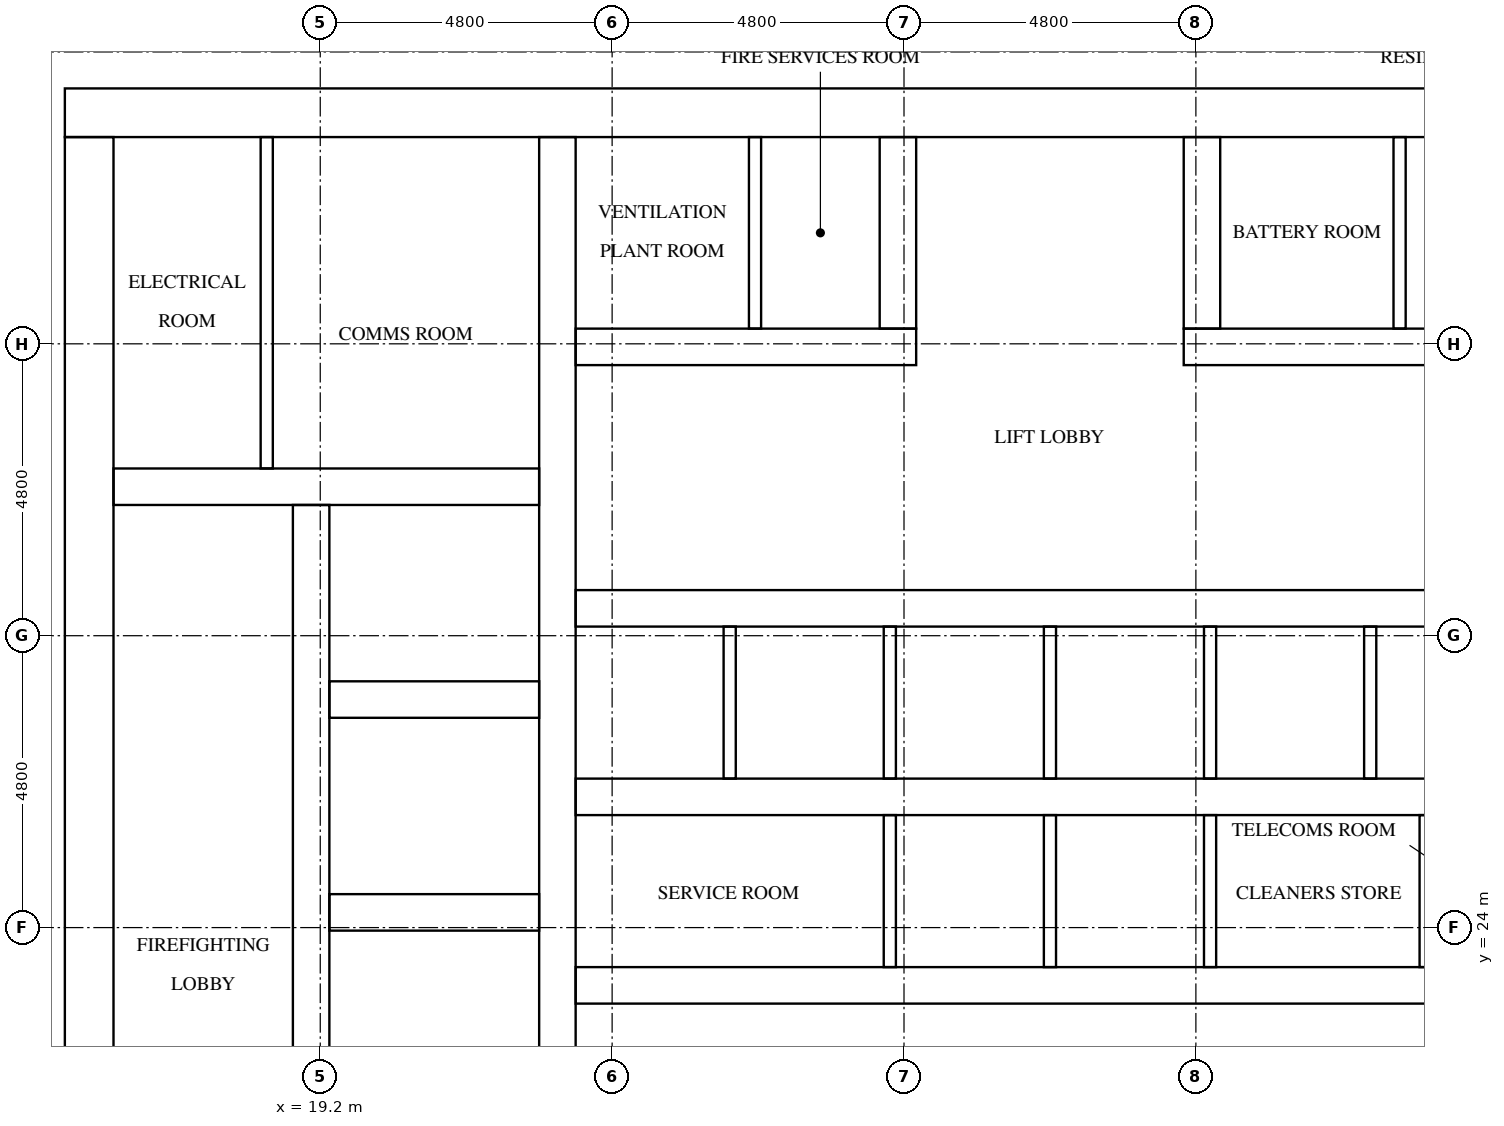
"""IFC4 building model, lengths in metres.
Left out: names, types, materials, properties, quantities, classifications, styles, units other than length and angle.
Written with IfcOpenShell. Run it as: python <this file> out.ifc"""

import sys

from ifc_helpers import new_model, si_unit, direction, frame, frame_2d, origin, place, context, subcontext, project, spatial, rectangle, extrude, element, fill, save


model = new_model("IFC4")
c1 = context("Model", 3, precision=1e-05, world=origin(), true_north=direction((0.0, 1.0)))
c2 = subcontext(c1, "Body", "Model", "MODEL_VIEW")
j1 = project(units=[si_unit("LENGTHUNIT", "METRE"), si_unit("PLANEANGLEUNIT", "RADIAN")], contexts=[c1])
p1 = place(None, origin())
s1 = spatial("IfcSite", under=j1, at=p1, CompositionType="ELEMENT")
p2 = place(p1, origin())
s2 = spatial("IfcBuilding", under=s1, at=p2, CompositionType="ELEMENT")
p3 = place(p2, frame((0.0, 0.0, 170.0)))
s3 = spatial("IfcBuildingStorey", under=s2, at=p3, CompositionType="ELEMENT", Elevation=170.0)
p4 = place(p3, frame((15.0, 37.4, 0.0), z_axis=(0.0, 0.0, 1.0), x_axis=(1.0, 0.0, 0.0)))
e1 = element("IfcWall", 1, at=p4, inside=s3, PredefinedType="SHEAR", context=c2, shape_type="SweptSolid", body=[
    extrude(rectangle(XDim=32.4, YDim=0.8, at=frame_2d((16.2, 0.0))), origin(), (0.0, 0.0, 1.0), 3.1),
])
p5 = place(p4, frame((15.3, 0.0, 0.0)))
e2 = element("IfcOpeningElement", 2, at=p5, cuts=e1, PredefinedType="OPENING", context=c2, shape_type="SweptSolid", body=[
    extrude(rectangle(XDim=1.8, YDim=2.1, at=frame_2d((0.9, 1.05))), frame((0.0, 0.41, 0.0), z_axis=(0.0, -1.0, 0.0), x_axis=(1.0, 0.0, 0.0)), (0.0, 0.0, 1.0), 0.82),
])
p6 = place(p4, frame((1.51, 0.0, 0.0)))
e3 = element("IfcOpeningElement", 3, at=p6, cuts=e1, PredefinedType="OPENING", context=c2, shape_type="SweptSolid", body=[
    extrude(rectangle(XDim=1.0, YDim=2.1, at=frame_2d((0.5, 1.05))), frame((0.0, 0.41, 0.0), z_axis=(0.0, -1.0, 0.0), x_axis=(1.0, 0.0, 0.0)), (0.0, 0.0, 1.0), 0.82),
])
p7 = place(p4, frame((5.11, 0.0, 0.0)))
e4 = element("IfcOpeningElement", 4, at=p7, cuts=e1, PredefinedType="OPENING", context=c2, shape_type="SweptSolid", body=[
    extrude(rectangle(XDim=1.0, YDim=2.1, at=frame_2d((0.5, 1.05))), frame((0.0, 0.41, 0.0), z_axis=(0.0, -1.0, 0.0), x_axis=(1.0, 0.0, 0.0)), (0.0, 0.0, 1.0), 0.82),
])
p8 = place(p3, frame((15.4, 15.8, 0.0), z_axis=(0.0, 0.0, 1.0), x_axis=(0.0, 1.0, 0.0)))
e5 = element("IfcWall", 5, at=p8, inside=s3, PredefinedType="SHEAR", context=c2, shape_type="SweptSolid", body=[
    extrude(rectangle(XDim=21.2, YDim=0.8, at=frame_2d((10.6, 0.0))), origin(), (0.0, 0.0, 1.0), 3.1),
])
p9 = place(p8, frame((4.96, 0.0, 0.0)))
e6 = element("IfcOpeningElement", 6, at=p9, cuts=e5, PredefinedType="OPENING", context=c2, shape_type="SweptSolid", body=[
    extrude(rectangle(XDim=1.2, YDim=2.1, at=frame_2d((0.6, 1.05))), frame((0.0, 0.41, 0.0), z_axis=(0.0, -1.0, 0.0), x_axis=(1.0, 0.0, 0.0)), (0.0, 0.0, 1.0), 0.82),
])
p10 = place(p3, frame((19.05, 15.8, 0.0), z_axis=(0.0, 0.0, 1.0), x_axis=(0.0, 1.0, 0.0)))
e7 = element("IfcWall", 7, at=p10, inside=s3, PredefinedType="SHEAR", context=c2, shape_type="SweptSolid", body=[
    extrude(rectangle(XDim=15.15, YDim=0.6, at=frame_2d((7.575, 0.0))), origin(), (0.0, 0.0, 1.0), 3.1),
])
p11 = place(p10, frame((9.65, 0.0, 0.0)))
e8 = element("IfcOpeningElement", 8, at=p11, cuts=e7, PredefinedType="OPENING", context=c2, shape_type="SweptSolid", body=[
    extrude(rectangle(XDim=1.1, YDim=2.1, at=frame_2d((0.55, 1.05))), frame((0.0, 0.31, 0.0), z_axis=(0.0, -1.0, 0.0), x_axis=(1.0, 0.0, 0.0)), (0.0, 0.0, 1.0), 0.62),
])
p12 = place(p10, frame((13.15, 0.0, 0.0)))
e9 = element("IfcOpeningElement", 9, at=p12, cuts=e7, PredefinedType="OPENING", context=c2, shape_type="SweptSolid", body=[
    extrude(rectangle(XDim=1.1, YDim=2.1, at=frame_2d((0.55, 1.05))), frame((0.0, 0.31, 0.0), z_axis=(0.0, -1.0, 0.0), x_axis=(1.0, 0.0, 0.0)), (0.0, 0.0, 1.0), 0.62),
])
p13 = place(p10, frame((0.4, 0.0, 0.0)))
e10 = element("IfcOpeningElement", 10, at=p13, cuts=e7, PredefinedType="OPENING", context=c2, shape_type="SweptSolid", body=[
    extrude(rectangle(XDim=1.2, YDim=2.1, at=frame_2d((0.6, 1.05))), frame((0.0, 0.31, 0.0), z_axis=(0.0, -1.0, 0.0), x_axis=(1.0, 0.0, 0.0)), (0.0, 0.0, 1.0), 0.62),
])
p14 = place(p3, frame((23.1, 15.8, 0.0), z_axis=(0.0, 0.0, 1.0), x_axis=(0.0, 1.0, 0.0)))
e11 = element("IfcWall", 11, at=p14, inside=s3, PredefinedType="SHEAR", context=c2, shape_type="SweptSolid", body=[
    extrude(rectangle(XDim=21.2, YDim=0.6, at=frame_2d((10.6, 0.0))), origin(), (0.0, 0.0, 1.0), 3.1),
])
for number, where, z_axis, x_axis in (
    (12, (19.35, 24.25, 0.0), (0.0, 0.0, 1.0), (1.0, 0.0, 0.0)),
    (13, (19.35, 27.75, 0.0), (0.0, 0.0, 1.0), (1.0, 0.0, 0.0)),
):
    element("IfcWall", number, at=place(p3, frame(where, z_axis=z_axis, x_axis=x_axis)), inside=s3, PredefinedType="SHEAR", context=c2, shape_type="SweptSolid", body=[
        extrude(rectangle(XDim=3.45, YDim=0.6, at=frame_2d((1.725, 0.0))), origin(), (0.0, 0.0, 1.0), 3.1),
    ])
p15 = place(p3, frame((15.8, 31.25, 0.0), z_axis=(0.0, 0.0, 1.0), x_axis=(1.0, 0.0, 0.0)))
e14 = element("IfcWall", 14, at=p15, inside=s3, PredefinedType="SHEAR", context=c2, shape_type="SweptSolid", body=[
    extrude(rectangle(XDim=7.0, YDim=0.6, at=frame_2d((3.5, 0.0))), origin(), (0.0, 0.0, 1.0), 3.1),
])
p16 = place(p3, frame((23.4, 23.05, 0.0), z_axis=(0.0, 0.0, 1.0), x_axis=(1.0, 0.0, 0.0)))
e15 = element("IfcWall", 15, at=p16, inside=s3, PredefinedType="SHEAR", context=c2, shape_type="SweptSolid", body=[
    extrude(rectangle(XDim=15.6, YDim=0.6, at=frame_2d((7.8, 0.0))), origin(), (0.0, 0.0, 1.0), 3.1),
])
p17 = place(p16, frame((2.033, 0.0, 0.0)))
e16 = element("IfcOpeningElement", 16, at=p17, cuts=e15, PredefinedType="OPENING", context=c2, shape_type="SweptSolid", body=[
    extrude(rectangle(XDim=1.0, YDim=2.1, at=frame_2d((0.5, 1.05))), frame((0.0, 0.31, 0.0), z_axis=(0.0, -1.0, 0.0), x_axis=(1.0, 0.0, 0.0)), (0.0, 0.0, 1.0), 0.62),
])
p18 = place(p16, frame((11.706, 0.0, 0.0)))
e17 = element("IfcOpeningElement", 17, at=p18, cuts=e15, PredefinedType="OPENING", context=c2, shape_type="SweptSolid", body=[
    extrude(rectangle(XDim=1.0, YDim=2.1, at=frame_2d((0.5, 1.05))), frame((0.0, 0.31, 0.0), z_axis=(0.0, -1.0, 0.0), x_axis=(1.0, 0.0, 0.0)), (0.0, 0.0, 1.0), 0.62),
])
p19 = place(p16, frame((14.339, 0.0, 0.0)))
e18 = element("IfcOpeningElement", 18, at=p19, cuts=e15, PredefinedType="OPENING", context=c2, shape_type="SweptSolid", body=[
    extrude(rectangle(XDim=1.0, YDim=2.1, at=frame_2d((0.5, 1.05))), frame((0.0, 0.31, 0.0), z_axis=(0.0, -1.0, 0.0), x_axis=(1.0, 0.0, 0.0)), (0.0, 0.0, 1.0), 0.62),
])
p20 = place(p3, frame((23.4, 26.15, 0.0), z_axis=(0.0, 0.0, 1.0), x_axis=(1.0, 0.0, 0.0)))
e19 = element("IfcWall", 19, at=p20, inside=s3, PredefinedType="SHEAR", context=c2, shape_type="SweptSolid", body=[
    extrude(rectangle(XDim=15.6, YDim=0.6, at=frame_2d((7.8, 0.0))), origin(), (0.0, 0.0, 1.0), 3.1),
])
p21 = place(p3, frame((23.4, 29.25, 0.0), z_axis=(0.0, 0.0, 1.0), x_axis=(1.0, 0.0, 0.0)))
e20 = element("IfcWall", 20, at=p21, inside=s3, PredefinedType="SHEAR", context=c2, shape_type="SweptSolid", body=[
    extrude(rectangle(XDim=15.6, YDim=0.6, at=frame_2d((7.8, 0.0))), origin(), (0.0, 0.0, 1.0), 3.1),
])
p22 = place(p21, frame((0.667, 0.0, 0.0)))
e21 = element("IfcOpeningElement", 21, at=p22, cuts=e20, PredefinedType="OPENING", context=c2, shape_type="SweptSolid", body=[
    extrude(rectangle(XDim=1.1, YDim=2.1, at=frame_2d((0.55, 1.05))), frame((0.0, 0.31, 0.0), z_axis=(0.0, -1.0, 0.0), x_axis=(1.0, 0.0, 0.0)), (0.0, 0.0, 1.0), 0.62),
])
p23 = place(p21, frame((3.3, 0.0, 0.0)))
e22 = element("IfcOpeningElement", 22, at=p23, cuts=e20, PredefinedType="OPENING", context=c2, shape_type="SweptSolid", body=[
    extrude(rectangle(XDim=1.1, YDim=2.1, at=frame_2d((0.55, 1.05))), frame((0.0, 0.31, 0.0), z_axis=(0.0, -1.0, 0.0), x_axis=(1.0, 0.0, 0.0)), (0.0, 0.0, 1.0), 0.62),
])
p24 = place(p21, frame((5.933, 0.0, 0.0)))
e23 = element("IfcOpeningElement", 23, at=p24, cuts=e20, PredefinedType="OPENING", context=c2, shape_type="SweptSolid", body=[
    extrude(rectangle(XDim=1.1, YDim=2.1, at=frame_2d((0.55, 1.05))), frame((0.0, 0.31, 0.0), z_axis=(0.0, -1.0, 0.0), x_axis=(1.0, 0.0, 0.0)), (0.0, 0.0, 1.0), 0.62),
])
p25 = place(p21, frame((8.567, 0.0, 0.0)))
e24 = element("IfcOpeningElement", 24, at=p25, cuts=e20, PredefinedType="OPENING", context=c2, shape_type="SweptSolid", body=[
    extrude(rectangle(XDim=1.1, YDim=2.1, at=frame_2d((0.55, 1.05))), frame((0.0, 0.31, 0.0), z_axis=(0.0, -1.0, 0.0), x_axis=(1.0, 0.0, 0.0)), (0.0, 0.0, 1.0), 0.62),
])
p26 = place(p21, frame((11.2, 0.0, 0.0)))
e25 = element("IfcOpeningElement", 25, at=p26, cuts=e20, PredefinedType="OPENING", context=c2, shape_type="SweptSolid", body=[
    extrude(rectangle(XDim=1.1, YDim=2.1, at=frame_2d((0.55, 1.05))), frame((0.0, 0.31, 0.0), z_axis=(0.0, -1.0, 0.0), x_axis=(1.0, 0.0, 0.0)), (0.0, 0.0, 1.0), 0.62),
])
p27 = place(p21, frame((13.833, 0.0, 0.0)))
e26 = element("IfcOpeningElement", 26, at=p27, cuts=e20, PredefinedType="OPENING", context=c2, shape_type="SweptSolid", body=[
    extrude(rectangle(XDim=1.1, YDim=2.1, at=frame_2d((0.55, 1.05))), frame((0.0, 0.31, 0.0), z_axis=(0.0, -1.0, 0.0), x_axis=(1.0, 0.0, 0.0)), (0.0, 0.0, 1.0), 0.62),
])
p28 = place(p3, frame((23.4, 33.55, 0.0), z_axis=(0.0, 0.0, 1.0), x_axis=(1.0, 0.0, 0.0)))
e27 = element("IfcWall", 27, at=p28, inside=s3, PredefinedType="SHEAR", context=c2, shape_type="SweptSolid", body=[
    extrude(rectangle(XDim=5.6, YDim=0.6, at=frame_2d((2.8, 0.0))), origin(), (0.0, 0.0, 1.0), 3.1),
])
p29 = place(p28, frame((0.925, 0.0, 0.0)))
e28 = element("IfcOpeningElement", 28, at=p29, cuts=e27, PredefinedType="OPENING", context=c2, shape_type="SweptSolid", body=[
    extrude(rectangle(XDim=1.0, YDim=2.1, at=frame_2d((0.5, 1.05))), frame((0.0, 0.31, 0.0), z_axis=(0.0, -1.0, 0.0), x_axis=(1.0, 0.0, 0.0)), (0.0, 0.0, 1.0), 0.62),
])
p30 = place(p28, frame((3.525, 0.0, 0.0)))
e29 = element("IfcOpeningElement", 29, at=p30, cuts=e27, PredefinedType="OPENING", context=c2, shape_type="SweptSolid", body=[
    extrude(rectangle(XDim=1.0, YDim=2.1, at=frame_2d((0.5, 1.05))), frame((0.0, 0.31, 0.0), z_axis=(0.0, -1.0, 0.0), x_axis=(1.0, 0.0, 0.0)), (0.0, 0.0, 1.0), 0.62),
])
p31 = place(p3, frame((33.4, 33.55, 0.0), z_axis=(0.0, 0.0, 1.0), x_axis=(1.0, 0.0, 0.0)))
e30 = element("IfcWall", 30, at=p31, inside=s3, PredefinedType="SHEAR", context=c2, shape_type="SweptSolid", body=[
    extrude(rectangle(XDim=5.6, YDim=0.6, at=frame_2d((2.8, 0.0))), origin(), (0.0, 0.0, 1.0), 3.1),
])
p32 = place(p31, frame((1.525, 0.0, 0.0)))
e31 = element("IfcOpeningElement", 31, at=p32, cuts=e30, PredefinedType="OPENING", context=c2, shape_type="SweptSolid", body=[
    extrude(rectangle(XDim=1.0, YDim=2.1, at=frame_2d((0.5, 1.05))), frame((0.0, 0.31, 0.0), z_axis=(0.0, -1.0, 0.0), x_axis=(1.0, 0.0, 0.0)), (0.0, 0.0, 1.0), 0.62),
])
p33 = place(p31, frame((4.125, 0.0, 0.0)))
e32 = element("IfcOpeningElement", 32, at=p33, cuts=e30, PredefinedType="OPENING", context=c2, shape_type="SweptSolid", body=[
    extrude(rectangle(XDim=1.0, YDim=2.1, at=frame_2d((0.5, 1.05))), frame((0.0, 0.31, 0.0), z_axis=(0.0, -1.0, 0.0), x_axis=(1.0, 0.0, 0.0)), (0.0, 0.0, 1.0), 0.62),
])
for number, where, z_axis, x_axis in (
    (33, (28.7, 33.85, 0.0), (0.0, 0.0, 1.0), (0.0, 1.0, 0.0)),
    (34, (33.7, 33.85, 0.0), (0.0, 0.0, 1.0), (0.0, 1.0, 0.0)),
):
    element("IfcWall", number, at=place(p3, frame(where, z_axis=z_axis, x_axis=x_axis)), inside=s3, PredefinedType="SHEAR", context=c2, shape_type="SweptSolid", body=[
        extrude(rectangle(XDim=3.15, YDim=0.6, at=frame_2d((1.575, 0.0))), origin(), (0.0, 0.0, 1.0), 3.1),
    ])
for number, where, z_axis, x_axis in (
    (35, (25.933, 26.45, 0.0), (0.0, 0.0, 1.0), (0.0, 1.0, 0.0)),
    (36, (28.567, 23.35, 0.0), (0.0, 0.0, 1.0), (0.0, 1.0, 0.0)),
    (37, (28.567, 26.45, 0.0), (0.0, 0.0, 1.0), (0.0, 1.0, 0.0)),
    (38, (31.2, 23.35, 0.0), (0.0, 0.0, 1.0), (0.0, 1.0, 0.0)),
    (39, (31.2, 26.45, 0.0), (0.0, 0.0, 1.0), (0.0, 1.0, 0.0)),
    (40, (33.833, 23.35, 0.0), (0.0, 0.0, 1.0), (0.0, 1.0, 0.0)),
    (41, (33.833, 26.45, 0.0), (0.0, 0.0, 1.0), (0.0, 1.0, 0.0)),
    (42, (36.467, 26.45, 0.0), (0.0, 0.0, 1.0), (0.0, 1.0, 0.0)),
):
    element("IfcWall", number, at=place(p3, frame(where, z_axis=z_axis, x_axis=x_axis)), inside=s3, PredefinedType="SOLIDWALL", context=c2, shape_type="SweptSolid", body=[
        extrude(rectangle(XDim=2.5, YDim=0.2, at=frame_2d((1.25, 0.0))), origin(), (0.0, 0.0, 1.0), 3.1),
    ])
p34 = place(p3, frame((18.32, 31.55, 0.0), z_axis=(0.0, 0.0, 1.0), x_axis=(0.0, 1.0, 0.0)))
e43 = element("IfcWall", 43, at=p34, inside=s3, PredefinedType="PARTITIONING", context=c2, shape_type="SweptSolid", body=[
    extrude(rectangle(XDim=5.45, YDim=0.2, at=frame_2d((2.725, 0.0))), origin(), (0.0, 0.0, 1.0), 3.1),
])
p35 = place(p3, frame((37.379, 23.35, 0.0), z_axis=(0.0, 0.0, 1.0), x_axis=(0.0, 1.0, 0.0)))
e44 = element("IfcWall", 44, at=p35, inside=s3, PredefinedType="PARTITIONING", context=c2, shape_type="SweptSolid", body=[
    extrude(rectangle(XDim=2.5, YDim=0.2, at=frame_2d((1.25, 0.0))), origin(), (0.0, 0.0, 1.0), 3.1),
])
for number, where, z_axis, x_axis in (
    (45, (26.35, 33.85, 0.0), (0.0, 0.0, 1.0), (0.0, 1.0, 0.0)),
    (46, (36.95, 33.85, 0.0), (0.0, 0.0, 1.0), (0.0, 1.0, 0.0)),
):
    element("IfcWall", number, at=place(p3, frame(where, z_axis=z_axis, x_axis=x_axis)), inside=s3, PredefinedType="PARTITIONING", context=c2, shape_type="SweptSolid", body=[
        extrude(rectangle(XDim=3.15, YDim=0.2, at=frame_2d((1.575, 0.0))), origin(), (0.0, 0.0, 1.0), 3.1),
    ])
p36 = place(p22, origin())
e47 = element("IfcDoor", 47, at=p36, inside=s3, OperationType="DOUBLE_DOOR_SLIDING", PredefinedType="DOOR", context=c2, shape_type="SweptSolid", body=[
    extrude(rectangle(XDim=1.1, YDim=2.1, at=frame_2d((0.55, 1.05))), frame((0.0, 0.025, 0.0), z_axis=(0.0, -1.0, 0.0), x_axis=(1.0, 0.0, 0.0)), (0.0, 0.0, 1.0), 0.05),
])
fill(e21, e47)
p37 = place(p23, origin())
e48 = element("IfcDoor", 48, at=p37, inside=s3, OperationType="DOUBLE_DOOR_SLIDING", PredefinedType="DOOR", context=c2, shape_type="SweptSolid", body=[
    extrude(rectangle(XDim=1.1, YDim=2.1, at=frame_2d((0.55, 1.05))), frame((0.0, 0.025, 0.0), z_axis=(0.0, -1.0, 0.0), x_axis=(1.0, 0.0, 0.0)), (0.0, 0.0, 1.0), 0.05),
])
fill(e22, e48)
p38 = place(p24, origin())
e49 = element("IfcDoor", 49, at=p38, inside=s3, OperationType="DOUBLE_DOOR_SLIDING", PredefinedType="DOOR", context=c2, shape_type="SweptSolid", body=[
    extrude(rectangle(XDim=1.1, YDim=2.1, at=frame_2d((0.55, 1.05))), frame((0.0, 0.025, 0.0), z_axis=(0.0, -1.0, 0.0), x_axis=(1.0, 0.0, 0.0)), (0.0, 0.0, 1.0), 0.05),
])
fill(e23, e49)
p39 = place(p25, origin())
e50 = element("IfcDoor", 50, at=p39, inside=s3, OperationType="DOUBLE_DOOR_SLIDING", PredefinedType="DOOR", context=c2, shape_type="SweptSolid", body=[
    extrude(rectangle(XDim=1.1, YDim=2.1, at=frame_2d((0.55, 1.05))), frame((0.0, 0.025, 0.0), z_axis=(0.0, -1.0, 0.0), x_axis=(1.0, 0.0, 0.0)), (0.0, 0.0, 1.0), 0.05),
])
fill(e24, e50)
p40 = place(p26, origin())
e51 = element("IfcDoor", 51, at=p40, inside=s3, OperationType="DOUBLE_DOOR_SLIDING", PredefinedType="DOOR", context=c2, shape_type="SweptSolid", body=[
    extrude(rectangle(XDim=1.1, YDim=2.1, at=frame_2d((0.55, 1.05))), frame((0.0, 0.025, 0.0), z_axis=(0.0, -1.0, 0.0), x_axis=(1.0, 0.0, 0.0)), (0.0, 0.0, 1.0), 0.05),
])
fill(e25, e51)
p41 = place(p27, origin())
e52 = element("IfcDoor", 52, at=p41, inside=s3, OperationType="DOUBLE_DOOR_SLIDING", PredefinedType="DOOR", context=c2, shape_type="SweptSolid", body=[
    extrude(rectangle(XDim=1.1, YDim=2.1, at=frame_2d((0.55, 1.05))), frame((0.0, 0.025, 0.0), z_axis=(0.0, -1.0, 0.0), x_axis=(1.0, 0.0, 0.0)), (0.0, 0.0, 1.0), 0.05),
])
fill(e26, e52)
p42 = place(p11, origin())
e53 = element("IfcDoor", 53, at=p42, inside=s3, OperationType="DOUBLE_DOOR_SLIDING", PredefinedType="DOOR", context=c2, shape_type="SweptSolid", body=[
    extrude(rectangle(XDim=1.1, YDim=2.1, at=frame_2d((0.55, 1.05))), frame((0.0, 0.025, 0.0), z_axis=(0.0, -1.0, 0.0), x_axis=(1.0, 0.0, 0.0)), (0.0, 0.0, 1.0), 0.05),
])
fill(e8, e53)
p43 = place(p12, origin())
e54 = element("IfcDoor", 54, at=p43, inside=s3, OperationType="DOUBLE_DOOR_SLIDING", PredefinedType="DOOR", context=c2, shape_type="SweptSolid", body=[
    extrude(rectangle(XDim=1.1, YDim=2.1, at=frame_2d((0.55, 1.05))), frame((0.0, 0.025, 0.0), z_axis=(0.0, -1.0, 0.0), x_axis=(1.0, 0.0, 0.0)), (0.0, 0.0, 1.0), 0.05),
])
fill(e9, e54)
p44 = place(p5, origin())
e55 = element("IfcDoor", 55, at=p44, inside=s3, OperationType="DOUBLE_DOOR_SINGLE_SWING", PredefinedType="DOOR", context=c2, shape_type="SweptSolid", body=[
    extrude(rectangle(XDim=1.8, YDim=2.1, at=frame_2d((0.9, 1.05))), frame((0.0, 0.025, 0.0), z_axis=(0.0, -1.0, 0.0), x_axis=(1.0, 0.0, 0.0)), (0.0, 0.0, 1.0), 0.05),
])
fill(e2, e55)
p45 = place(p6, origin())
e56 = element("IfcDoor", 56, at=p45, inside=s3, OperationType="SINGLE_SWING_LEFT", PredefinedType="DOOR", context=c2, shape_type="SweptSolid", body=[
    extrude(rectangle(XDim=1.0, YDim=2.1, at=frame_2d((0.5, 1.05))), frame((0.0, 0.025, 0.0), z_axis=(0.0, -1.0, 0.0), x_axis=(1.0, 0.0, 0.0)), (0.0, 0.0, 1.0), 0.05),
])
fill(e3, e56)
p46 = place(p7, origin())
e57 = element("IfcDoor", 57, at=p46, inside=s3, OperationType="SINGLE_SWING_RIGHT", PredefinedType="DOOR", context=c2, shape_type="SweptSolid", body=[
    extrude(rectangle(XDim=1.0, YDim=2.1, at=frame_2d((0.5, 1.05))), frame((0.0, 0.025, 0.0), z_axis=(0.0, -1.0, 0.0), x_axis=(1.0, 0.0, 0.0)), (0.0, 0.0, 1.0), 0.05),
])
fill(e4, e57)
p47 = place(p17, frame((1.0, 0.0, 0.0), z_axis=(0.0, 0.0, 1.0), x_axis=(-1.0, 0.0, 0.0)))
e58 = element("IfcDoor", 58, at=p47, inside=s3, OperationType="SINGLE_SWING_LEFT", PredefinedType="DOOR", context=c2, shape_type="SweptSolid", body=[
    extrude(rectangle(XDim=1.0, YDim=2.1, at=frame_2d((0.5, 1.05))), frame((0.0, 0.025, 0.0), z_axis=(0.0, -1.0, 0.0), x_axis=(1.0, 0.0, 0.0)), (0.0, 0.0, 1.0), 0.05),
])
fill(e16, e58)
p48 = place(p18, frame((1.0, 0.0, 0.0), z_axis=(0.0, 0.0, 1.0), x_axis=(-1.0, 0.0, 0.0)))
e59 = element("IfcDoor", 59, at=p48, inside=s3, OperationType="SINGLE_SWING_RIGHT", PredefinedType="DOOR", context=c2, shape_type="SweptSolid", body=[
    extrude(rectangle(XDim=1.0, YDim=2.1, at=frame_2d((0.5, 1.05))), frame((0.0, 0.025, 0.0), z_axis=(0.0, -1.0, 0.0), x_axis=(1.0, 0.0, 0.0)), (0.0, 0.0, 1.0), 0.05),
])
fill(e17, e59)
p49 = place(p29, frame((1.0, 0.0, 0.0), z_axis=(0.0, 0.0, 1.0), x_axis=(-1.0, 0.0, 0.0)))
e60 = element("IfcDoor", 60, at=p49, inside=s3, OperationType="SINGLE_SWING_RIGHT", PredefinedType="DOOR", context=c2, shape_type="SweptSolid", body=[
    extrude(rectangle(XDim=1.0, YDim=2.1, at=frame_2d((0.5, 1.05))), frame((0.0, 0.025, 0.0), z_axis=(0.0, -1.0, 0.0), x_axis=(1.0, 0.0, 0.0)), (0.0, 0.0, 1.0), 0.05),
])
fill(e28, e60)
p50 = place(p30, frame((1.0, 0.0, 0.0), z_axis=(0.0, 0.0, 1.0), x_axis=(-1.0, 0.0, 0.0)))
e61 = element("IfcDoor", 61, at=p50, inside=s3, OperationType="SINGLE_SWING_LEFT", PredefinedType="DOOR", context=c2, shape_type="SweptSolid", body=[
    extrude(rectangle(XDim=1.0, YDim=2.1, at=frame_2d((0.5, 1.05))), frame((0.0, 0.025, 0.0), z_axis=(0.0, -1.0, 0.0), x_axis=(1.0, 0.0, 0.0)), (0.0, 0.0, 1.0), 0.05),
])
fill(e29, e61)
p51 = place(p32, frame((1.0, 0.0, 0.0), z_axis=(0.0, 0.0, 1.0), x_axis=(-1.0, 0.0, 0.0)))
e62 = element("IfcDoor", 62, at=p51, inside=s3, OperationType="SINGLE_SWING_RIGHT", PredefinedType="DOOR", context=c2, shape_type="SweptSolid", body=[
    extrude(rectangle(XDim=1.0, YDim=2.1, at=frame_2d((0.5, 1.05))), frame((0.0, 0.025, 0.0), z_axis=(0.0, -1.0, 0.0), x_axis=(1.0, 0.0, 0.0)), (0.0, 0.0, 1.0), 0.05),
])
fill(e31, e62)
save(model, sys.argv[1])
